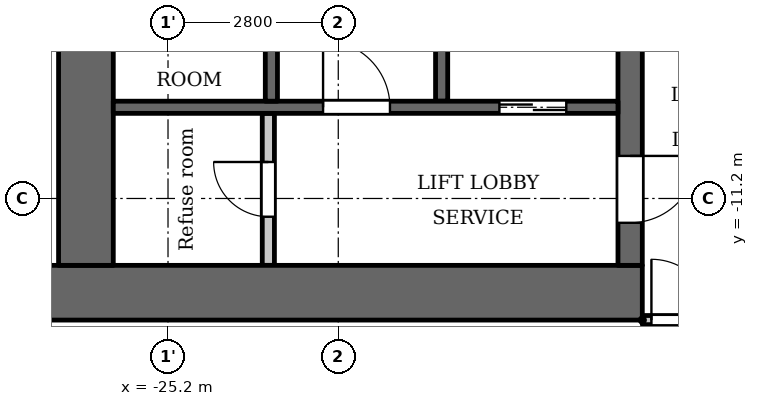
"""IFC4 building model, lengths in metres.
Left out: names, types, materials, properties, quantities, classifications, styles, units other than length and angle.
Written with IfcOpenShell. Run it as: python <this file> out.ifc"""

import sys

from ifc_helpers import new_model, si_unit, direction, frame, frame_2d, origin, place, context, subcontext, project, spatial, rectangle, extrude, element, fill, save


model = new_model("IFC4")
c1 = context("Model", 3, precision=1e-05, world=origin(), true_north=direction((0.0, 1.0)))
c2 = subcontext(c1, "Body", "Model", "MODEL_VIEW")
j1 = project(units=[si_unit("LENGTHUNIT", "METRE"), si_unit("PLANEANGLEUNIT", "RADIAN")], contexts=[c1])
p1 = place(None, origin())
s1 = spatial("IfcSite", under=j1, at=p1, CompositionType="ELEMENT")
p2 = place(p1, origin())
s2 = spatial("IfcBuilding", under=s1, at=p2, CompositionType="ELEMENT")
p3 = place(p2, frame((0.0, 0.0, 83.3)))
s3 = spatial("IfcBuildingStorey", under=s2, at=p3, CompositionType="ELEMENT", Elevation=83.3)
p4 = place(p3, frame((-20.7, -9.6, 0.0), z_axis=(0.0, 0.0, 1.0), x_axis=(0.0, 1.0, 0.0)))
e1 = element("IfcWall", 1, at=p4, inside=s3, PredefinedType="SHEAR", context=c2, shape_type="SweptSolid", body=[
    extrude(rectangle(XDim=9.75, YDim=0.2, at=frame_2d((4.875, 0.0))), origin(), (0.0, 0.0, 1.0), 3.2),
])
p5 = place(p3, frame((-17.4, -12.75, 0.0), z_axis=(0.0, 0.0, 1.0), x_axis=(-1.0, 0.0, 0.0)))
e2 = element("IfcWall", 2, at=p5, inside=s3, PredefinedType="SHEAR", context=c2, shape_type="SweptSolid", body=[
    extrude(rectangle(XDim=10.4, YDim=0.9, at=frame_2d((5.2, 0.0))), origin(), (0.0, 0.0, 1.0), 3.2),
])
p6 = place(p3, frame((-17.6, -12.3, 0.0), z_axis=(0.0, 0.0, 1.0), x_axis=(0.0, 1.0, 0.0)))
e3 = element("IfcWall", 3, at=p6, inside=s3, PredefinedType="SHEAR", context=c2, shape_type="SweptSolid", body=[
    extrude(rectangle(XDim=24.6, YDim=0.4, at=frame_2d((12.3, 0.0))), origin(), (0.0, 0.0, 1.0), 3.2),
])
p7 = place(p6, frame((6.0, 0.0, 0.0)))
e4 = element("IfcOpeningElement", 4, at=p7, cuts=e3, PredefinedType="OPENING", context=c2, shape_type="SweptSolid", body=[
    extrude(rectangle(XDim=1.1, YDim=2.1, at=frame_2d((0.55, 1.05))), frame((0.0, 0.21, 0.0), z_axis=(0.0, -1.0, 0.0), x_axis=(1.0, 0.0, 0.0)), (0.0, 0.0, 1.0), 0.42),
])
p8 = place(p6, frame((8.4, 0.0, 0.0)))
e5 = element("IfcOpeningElement", 5, at=p8, cuts=e3, PredefinedType="OPENING", context=c2, shape_type="SweptSolid", body=[
    extrude(rectangle(XDim=1.1, YDim=2.1, at=frame_2d((0.55, 1.05))), frame((0.0, 0.21, 0.0), z_axis=(0.0, -1.0, 0.0), x_axis=(1.0, 0.0, 0.0)), (0.0, 0.0, 1.0), 0.42),
])
p9 = place(p6, frame((10.8, 0.0, 0.0)))
e6 = element("IfcOpeningElement", 6, at=p9, cuts=e3, PredefinedType="OPENING", context=c2, shape_type="SweptSolid", body=[
    extrude(rectangle(XDim=1.1, YDim=2.1, at=frame_2d((0.55, 1.05))), frame((0.0, 0.21, 0.0), z_axis=(0.0, -1.0, 0.0), x_axis=(1.0, 0.0, 0.0)), (0.0, 0.0, 1.0), 0.42),
])
p10 = place(p6, frame((16.75, 0.0, 0.0)))
e7 = element("IfcOpeningElement", 7, at=p10, cuts=e3, PredefinedType="OPENING", context=c2, shape_type="SweptSolid", body=[
    extrude(rectangle(XDim=0.9, YDim=2.1, at=frame_2d((0.45, 1.05))), frame((0.0, 0.21, 0.0), z_axis=(0.0, -1.0, 0.0), x_axis=(1.0, 0.0, 0.0)), (0.0, 0.0, 1.0), 0.42),
])
p11 = place(p6, frame((22.8, 0.0, 0.0)))
e8 = element("IfcOpeningElement", 8, at=p11, cuts=e3, PredefinedType="OPENING", context=c2, shape_type="SweptSolid", body=[
    extrude(rectangle(XDim=1.1, YDim=2.1, at=frame_2d((0.55, 1.05))), frame((0.0, 0.21, 0.0), z_axis=(0.0, -1.0, 0.0), x_axis=(1.0, 0.0, 0.0)), (0.0, 0.0, 1.0), 0.42),
])
p12 = place(p6, frame((0.7, 0.0, 0.0)))
e9 = element("IfcOpeningElement", 9, at=p12, cuts=e3, PredefinedType="OPENING", context=c2, shape_type="SweptSolid", body=[
    extrude(rectangle(XDim=1.1, YDim=2.1, at=frame_2d((0.55, 1.05))), frame((0.0, 0.21, 0.0), z_axis=(0.0, -1.0, 0.0), x_axis=(1.0, 0.0, 0.0)), (0.0, 0.0, 1.0), 0.42),
])
p13 = place(p6, frame((12.775, 0.0, 0.0)))
e10 = element("IfcOpeningElement", 10, at=p13, cuts=e3, PredefinedType="OPENING", context=c2, shape_type="SweptSolid", body=[
    extrude(rectangle(XDim=1.8, YDim=2.1, at=frame_2d((0.9, 1.05))), frame((0.0, 0.21, 0.0), z_axis=(0.0, -1.0, 0.0), x_axis=(1.0, 0.0, 0.0)), (0.0, 0.0, 1.0), 0.42),
])
p14 = place(p3, frame((-26.55, -12.3, 0.0), z_axis=(0.0, 0.0, 1.0), x_axis=(0.0, 1.0, 0.0)))
e11 = element("IfcWall", 11, at=p14, inside=s3, PredefinedType="SHEAR", context=c2, shape_type="SweptSolid", body=[
    extrude(rectangle(XDim=24.6, YDim=0.9, at=frame_2d((12.3, 0.0))), origin(), (0.0, 0.0, 1.0), 3.2),
])
p15 = place(p3, frame((-23.55, -12.3, 0.0), z_axis=(0.0, 0.0, 1.0), x_axis=(0.0, 1.0, 0.0)))
e12 = element("IfcWall", 12, at=p15, inside=s3, PredefinedType="PARTITIONING", context=c2, shape_type="SweptSolid", body=[
    extrude(rectangle(XDim=2.5, YDim=0.2, at=frame_2d((1.25, 0.0))), origin(), (0.0, 0.0, 1.0), 3.2),
])
p16 = place(p15, frame((0.8, 0.0, 0.0)))
e13 = element("IfcOpeningElement", 13, at=p16, cuts=e12, PredefinedType="OPENING", context=c2, shape_type="SweptSolid", body=[
    extrude(rectangle(XDim=0.9, YDim=2.1, at=frame_2d((0.45, 1.05))), frame((0.0, 0.11, 0.0), z_axis=(0.0, -1.0, 0.0), x_axis=(1.0, 0.0, 0.0)), (0.0, 0.0, 1.0), 0.22),
])
p17 = place(p3, frame((-17.8, -9.7, 0.0), z_axis=(0.0, 0.0, 1.0), x_axis=(-1.0, 0.0, 0.0)))
e14 = element("IfcWall", 14, at=p17, inside=s3, PredefinedType="SHEAR", context=c2, shape_type="SweptSolid", body=[
    extrude(rectangle(XDim=8.3, YDim=0.2, at=frame_2d((4.15, 0.0))), origin(), (0.0, 0.0, 1.0), 3.2),
])
p18 = place(p17, frame((0.85, 0.0, 0.0)))
e15 = element("IfcOpeningElement", 15, at=p18, cuts=e14, PredefinedType="OPENING", context=c2, shape_type="SweptSolid", body=[
    extrude(rectangle(XDim=1.1, YDim=2.1, at=frame_2d((0.55, 1.05))), frame((0.0, 0.11, 0.0), z_axis=(0.0, -1.0, 0.0), x_axis=(1.0, 0.0, 0.0)), (0.0, 0.0, 1.0), 0.22),
])
p19 = place(p17, frame((3.75, 0.0, 0.0)))
e16 = element("IfcOpeningElement", 16, at=p19, cuts=e14, PredefinedType="OPENING", context=c2, shape_type="SweptSolid", body=[
    extrude(rectangle(XDim=1.1, YDim=2.1, at=frame_2d((0.55, 1.05))), frame((0.0, 0.11, 0.0), z_axis=(0.0, -1.0, 0.0), x_axis=(1.0, 0.0, 0.0)), (0.0, 0.0, 1.0), 0.22),
])
p20 = place(p3, frame((-23.5, -9.6, 0.0), z_axis=(0.0, 0.0, 1.0), x_axis=(0.0, 1.0, 0.0)))
e17 = element("IfcWall", 17, at=p20, inside=s3, PredefinedType="SHEAR", context=c2, shape_type="SweptSolid", body=[
    extrude(rectangle(XDim=6.9, YDim=0.2, at=frame_2d((3.45, 0.0))), origin(), (0.0, 0.0, 1.0), 3.2),
])
p21 = place(p3, frame((-17.4, -13.2, 0.0), z_axis=(0.0, 0.0, 1.0), x_axis=(1.0, 0.0, 0.0)))
e18 = element("IfcWall", 18, at=p21, inside=s3, PredefinedType="PARTITIONING", context=c2, shape_type="SweptSolid", body=[
    extrude(rectangle(XDim=34.8, YDim=0.15, at=frame_2d((17.4, 0.0))), origin(), (0.0, 0.0, 1.0), 3.2),
])
p22 = place(p21, frame((0.15, 0.0, 0.0)))
e19 = element("IfcOpeningElement", 19, at=p22, cuts=e18, PredefinedType="OPENING", context=c2, shape_type="SweptSolid", body=[
    extrude(rectangle(XDim=1.0, YDim=2.1, at=frame_2d((0.5, 1.05))), frame((0.0, 0.085, 0.0), z_axis=(0.0, -1.0, 0.0), x_axis=(1.0, 0.0, 0.0)), (0.0, 0.0, 1.0), 0.17),
])
p23 = place(p21, frame((33.55, 0.0, 0.0)))
e20 = element("IfcOpeningElement", 20, at=p23, cuts=e18, PredefinedType="OPENING", context=c2, shape_type="SweptSolid", body=[
    extrude(rectangle(XDim=1.0, YDim=2.1, at=frame_2d((0.5, 1.05))), frame((0.0, 0.085, 0.0), z_axis=(0.0, -1.0, 0.0), x_axis=(1.0, 0.0, 0.0)), (0.0, 0.0, 1.0), 0.17),
])
p24 = place(p21, frame((7.35, 0.0, 0.0)))
e21 = element("IfcOpeningElement", 21, at=p24, cuts=e18, PredefinedType="OPENING", context=c2, shape_type="SweptSolid", body=[
    extrude(rectangle(XDim=1.0, YDim=2.1, at=frame_2d((0.5, 1.05))), frame((0.0, 0.085, 0.0), z_axis=(0.0, -1.0, 0.0), x_axis=(1.0, 0.0, 0.0)), (0.0, 0.0, 1.0), 0.17),
])
p25 = place(p21, frame((13.7, 0.0, 0.0)))
e22 = element("IfcOpeningElement", 22, at=p25, cuts=e18, PredefinedType="OPENING", context=c2, shape_type="SweptSolid", body=[
    extrude(rectangle(XDim=1.0, YDim=2.1, at=frame_2d((0.5, 1.05))), frame((0.0, 0.085, 0.0), z_axis=(0.0, -1.0, 0.0), x_axis=(1.0, 0.0, 0.0)), (0.0, 0.0, 1.0), 0.17),
])
p26 = place(p21, frame((19.3, 0.0, 0.0)))
e23 = element("IfcOpeningElement", 23, at=p26, cuts=e18, PredefinedType="OPENING", context=c2, shape_type="SweptSolid", body=[
    extrude(rectangle(XDim=1.0, YDim=2.1, at=frame_2d((0.5, 1.05))), frame((0.0, 0.085, 0.0), z_axis=(0.0, -1.0, 0.0), x_axis=(1.0, 0.0, 0.0)), (0.0, 0.0, 1.0), 0.17),
])
p27 = place(p18, origin())
e24 = element("IfcDoor", 24, at=p27, inside=s3, OperationType="DOUBLE_DOOR_SLIDING", PredefinedType="DOOR", context=c2, shape_type="SweptSolid", body=[
    extrude(rectangle(XDim=1.1, YDim=2.1, at=frame_2d((0.55, 1.05))), frame((0.0, 0.025, 0.0), z_axis=(0.0, -1.0, 0.0), x_axis=(1.0, 0.0, 0.0)), (0.0, 0.0, 1.0), 0.05),
])
fill(e15, e24)
p28 = place(p12, origin())
e25 = element("IfcDoor", 25, at=p28, inside=s3, OperationType="SINGLE_SWING_RIGHT", PredefinedType="DOOR", context=c2, shape_type="SweptSolid", body=[
    extrude(rectangle(XDim=1.1, YDim=2.1, at=frame_2d((0.55, 1.05))), frame((0.0, 0.025, 0.0), z_axis=(0.0, -1.0, 0.0), x_axis=(1.0, 0.0, 0.0)), (0.0, 0.0, 1.0), 0.05),
])
fill(e9, e25)
p29 = place(p16, origin())
e26 = element("IfcDoor", 26, at=p29, inside=s3, OperationType="SINGLE_SWING_LEFT", PredefinedType="DOOR", context=c2, shape_type="SweptSolid", body=[
    extrude(rectangle(XDim=0.9, YDim=2.1, at=frame_2d((0.45, 1.05))), frame((0.0, 0.025, 0.0), z_axis=(0.0, -1.0, 0.0), x_axis=(1.0, 0.0, 0.0)), (0.0, 0.0, 1.0), 0.05),
])
fill(e13, e26)
p30 = place(p19, origin())
e27 = element("IfcDoor", 27, at=p30, inside=s3, OperationType="SINGLE_SWING_RIGHT", PredefinedType="DOOR", context=c2, shape_type="SweptSolid", body=[
    extrude(rectangle(XDim=1.1, YDim=2.1, at=frame_2d((0.55, 1.05))), frame((0.0, 0.025, 0.0), z_axis=(0.0, -1.0, 0.0), x_axis=(1.0, 0.0, 0.0)), (0.0, 0.0, 1.0), 0.05),
])
fill(e16, e27)
p31 = place(p22, origin())
e28 = element("IfcDoor", 28, at=p31, inside=s3, OperationType="SINGLE_SWING_RIGHT", PredefinedType="DOOR", context=c2, shape_type="SweptSolid", body=[
    extrude(rectangle(XDim=1.0, YDim=2.1, at=frame_2d((0.5, 1.05))), frame((0.0, 0.025, 0.0), z_axis=(0.0, -1.0, 0.0), x_axis=(1.0, 0.0, 0.0)), (0.0, 0.0, 1.0), 0.05),
])
fill(e19, e28)
save(model, sys.argv[1])
